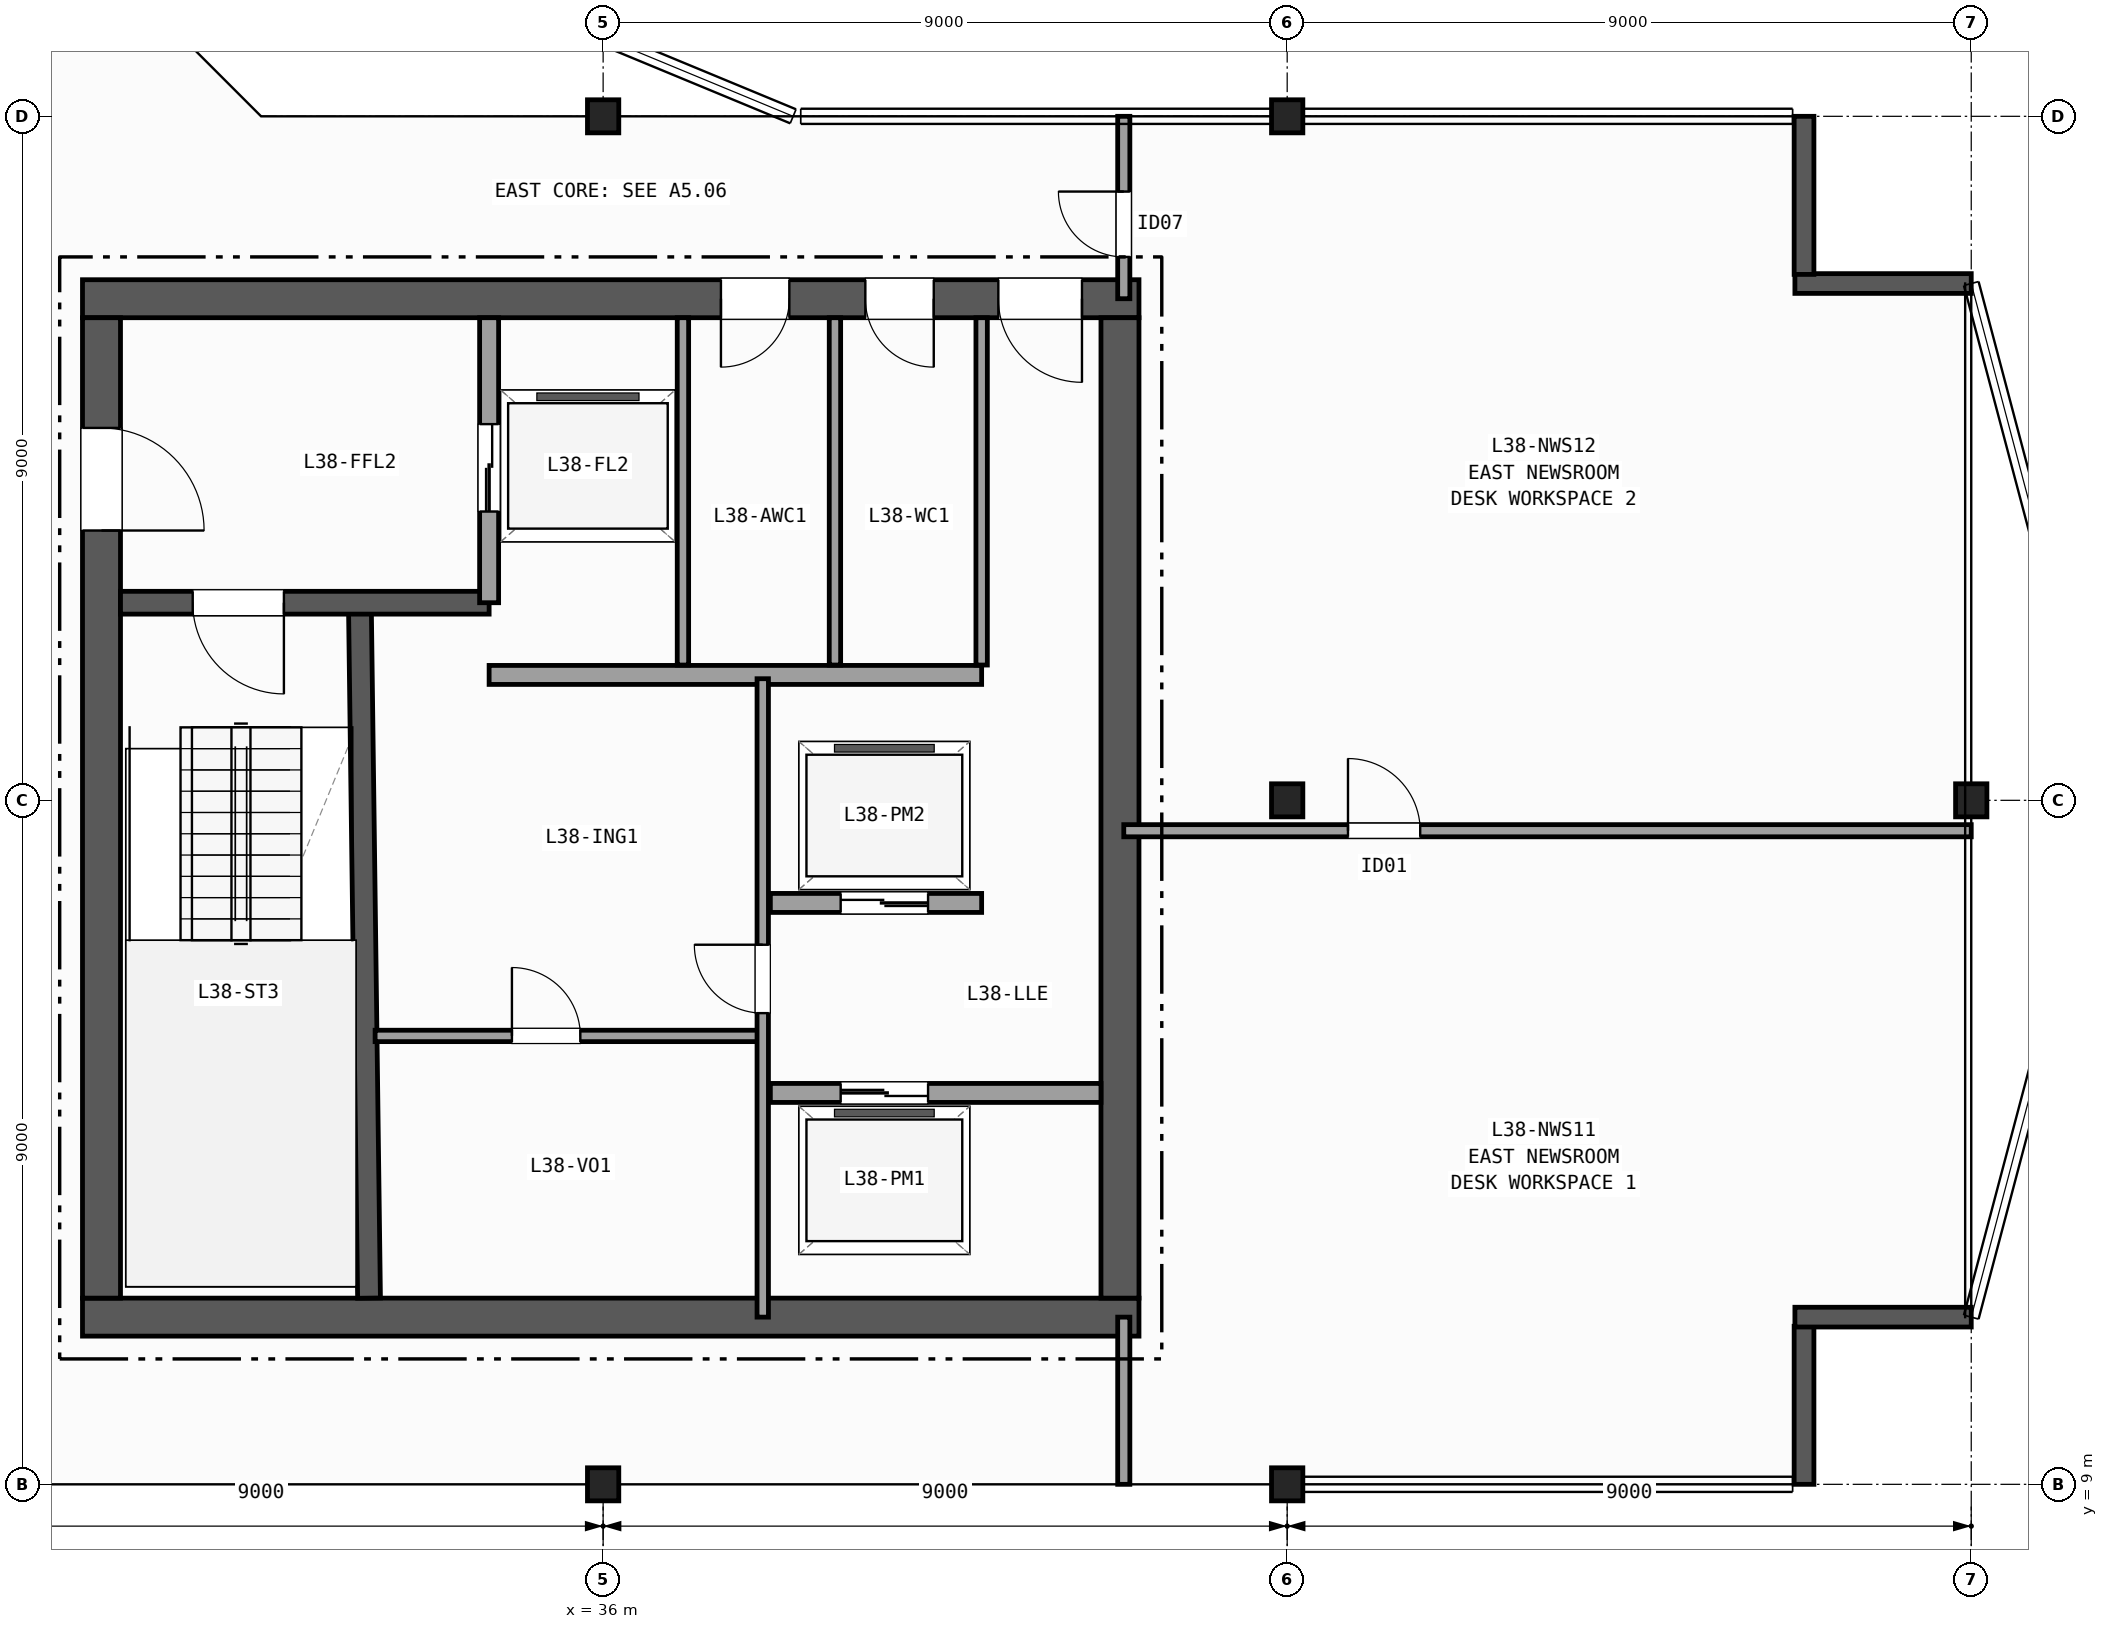
"""IFC4 building model, lengths in metres.
Left out: names, types, materials, properties, quantities, classifications, styles, units other than length and angle.
Written with IfcOpenShell. Run it as: python <this file> out.ifc"""

import sys

from ifc_helpers import new_model, si_unit, direction, frame, frame_2d, origin, origin_2d, place, context, subcontext, project, spatial, rectangle, i_section, extrude, element, fill, save


model = new_model("IFC4")
c1 = context("Model", 3, precision=1e-05, world=origin(), true_north=direction((0.0, 1.0)))
c2 = subcontext(c1, "Body", "Model", "MODEL_VIEW")
j1 = project(units=[si_unit("LENGTHUNIT", "METRE"), si_unit("PLANEANGLEUNIT", "RADIAN")], contexts=[c1])
p1 = place(None, origin())
s1 = spatial("IfcSite", under=j1, at=p1, CompositionType="ELEMENT")
p2 = place(p1, origin())
s2 = spatial("IfcBuilding", under=s1, at=p2, CompositionType="ELEMENT")
p3 = place(p2, frame((0.0, 0.0, 154.4)))
s3 = spatial("IfcBuildingStorey", under=s2, at=p3, CompositionType="ELEMENT", Elevation=154.4)
for number, where, z_axis, x_axis in (
    (1, (36.0, 9.0, 0.0), (0.0, 0.0, 1.0), (1.0, 0.0, 0.0)),
    (2, (36.0, 27.0, 0.0), (0.0, 0.0, 1.0), (1.0, 0.0, 0.0)),
    (3, (45.0, 9.0, 0.0), (0.0, 0.0, 1.0), (1.0, 0.0, 0.0)),
    (4, (45.0, 18.0, 0.0), (0.0, 0.0, 1.0), (1.0, 0.0, 0.0)),
    (5, (45.0, 27.0, 0.0), (0.0, 0.0, 1.0), (1.0, 0.0, 0.0)),
    (6, (54.0, 18.0, 0.0), (0.0, 0.0, 1.0), (1.0, 0.0, 0.0)),
):
    element("IfcColumn", number, at=place(p3, frame(where, z_axis=z_axis, x_axis=x_axis)), inside=s3, PredefinedType="COLUMN", context=c2, shape_type="SweptSolid", body=[
        extrude(i_section(OverallWidth=0.412, OverallDepth=0.435, WebThickness=0.036, FlangeThickness=0.057, FilletRadius=0.015, at=origin_2d()), origin(), (0.0, 0.0, 1.0), 3.7),
    ])
p4 = place(p3, frame((51.8, 9.0, 0.0), z_axis=(0.0, 0.0, 1.0), x_axis=(0.0, 1.0, 0.0)))
e7 = element("IfcWall", 7, at=p4, inside=s3, PredefinedType="SOLIDWALL", context=c2, shape_type="SweptSolid", body=[
    extrude(rectangle(XDim=2.08, YDim=0.26, at=frame_2d((1.04, 0.0))), origin(), (0.0, 0.0, 1.0), 3.42),
])
for number, where, z_axis, x_axis in (
    (8, (51.68, 11.2, 0.0), (0.0, 0.0, 1.0), (1.0, 0.0, 0.0)),
    (9, (54.0, 24.8, 0.0), (0.0, 0.0, 1.0), (-1.0, 0.0, 0.0)),
):
    element("IfcWall", number, at=place(p3, frame(where, z_axis=z_axis, x_axis=x_axis)), inside=s3, PredefinedType="SOLIDWALL", context=c2, shape_type="SweptSolid", body=[
        extrude(rectangle(XDim=2.32, YDim=0.26, at=frame_2d((1.16, 0.0))), origin(), (0.0, 0.0, 1.0), 3.42),
    ])
p5 = place(p3, frame((51.8, 24.92, 0.0), z_axis=(0.0, 0.0, 1.0), x_axis=(0.0, 1.0, 0.0)))
e10 = element("IfcWall", 10, at=p5, inside=s3, PredefinedType="SOLIDWALL", context=c2, shape_type="SweptSolid", body=[
    extrude(rectangle(XDim=2.08, YDim=0.26, at=frame_2d((1.04, 0.0))), origin(), (0.0, 0.0, 1.0), 3.42),
])
p6 = place(p3, frame((29.15, 11.2, 0.0), z_axis=(0.0, 0.0, 1.0), x_axis=(1.0, 0.0, 0.0)))
e11 = element("IfcWall", 11, at=p6, inside=s3, PredefinedType="SHEAR", context=c2, shape_type="SweptSolid", body=[
    extrude(rectangle(XDim=13.9, YDim=0.5, at=frame_2d((6.95, 0.0))), origin(), (0.0, 0.0, 1.0), 3.42),
])
p7 = place(p3, frame((43.05, 24.6, 0.0), z_axis=(0.0, 0.0, 1.0), x_axis=(-1.0, 0.0, 0.0)))
e12 = element("IfcWall", 12, at=p7, inside=s3, PredefinedType="SHEAR", context=c2, shape_type="SweptSolid", body=[
    extrude(rectangle(XDim=13.9, YDim=0.5, at=frame_2d((6.95, 0.0))), origin(), (0.0, 0.0, 1.0), 3.42),
])
p8 = place(p7, frame((0.75, 0.0, 0.0)))
e13 = element("IfcOpeningElement", 13, at=p8, cuts=e12, PredefinedType="OPENING", context=c2, shape_type="SweptSolid", body=[
    extrude(rectangle(XDim=1.1, YDim=2.15, at=frame_2d((0.55, 1.075))), frame((0.0, 0.26, 0.0), z_axis=(0.0, -1.0, 0.0), x_axis=(1.0, 0.0, 0.0)), (0.0, 0.0, 1.0), 0.52),
])
p9 = place(p7, frame((2.7, 0.0, 0.0)))
e14 = element("IfcOpeningElement", 14, at=p9, cuts=e12, PredefinedType="OPENING", context=c2, shape_type="SweptSolid", body=[
    extrude(rectangle(XDim=0.9, YDim=2.1, at=frame_2d((0.45, 1.05))), frame((0.0, 0.26, 0.0), z_axis=(0.0, -1.0, 0.0), x_axis=(1.0, 0.0, 0.0)), (0.0, 0.0, 1.0), 0.52),
])
p10 = place(p7, frame((4.6, 0.0, 0.0)))
e15 = element("IfcOpeningElement", 15, at=p10, cuts=e12, PredefinedType="OPENING", context=c2, shape_type="SweptSolid", body=[
    extrude(rectangle(XDim=0.9, YDim=2.1, at=frame_2d((0.45, 1.05))), frame((0.0, 0.26, 0.0), z_axis=(0.0, -1.0, 0.0), x_axis=(1.0, 0.0, 0.0)), (0.0, 0.0, 1.0), 0.52),
])
p11 = place(p3, frame((29.4, 24.35, 0.0), z_axis=(0.0, 0.0, 1.0), x_axis=(0.0, -1.0, 0.0)))
e16 = element("IfcWall", 16, at=p11, inside=s3, PredefinedType="SHEAR", context=c2, shape_type="SweptSolid", body=[
    extrude(rectangle(XDim=12.9, YDim=0.5, at=frame_2d((6.45, 0.0))), origin(), (0.0, 0.0, 1.0), 3.42),
])
p12 = place(p11, frame((1.45, 0.0, 0.0)))
e17 = element("IfcOpeningElement", 17, at=p12, cuts=e16, PredefinedType="OPENING", context=c2, shape_type="SweptSolid", body=[
    extrude(rectangle(XDim=1.35, YDim=2.15, at=frame_2d((0.675, 1.075))), frame((0.0, 0.26, 0.0), z_axis=(0.0, -1.0, 0.0), x_axis=(1.0, 0.0, 0.0)), (0.0, 0.0, 1.0), 0.52),
])
p13 = place(p3, frame((42.8, 11.45, 0.0), z_axis=(0.0, 0.0, 1.0), x_axis=(0.0, 1.0, 0.0)))
e18 = element("IfcWall", 18, at=p13, inside=s3, PredefinedType="SHEAR", context=c2, shape_type="SweptSolid", body=[
    extrude(rectangle(XDim=12.9, YDim=0.5, at=frame_2d((6.45, 0.0))), origin(), (0.0, 0.0, 1.0), 3.42),
])
p14 = place(p3, frame((32.92, 11.45, 0.0), z_axis=(0.0, 0.0, 1.0), x_axis=(-0.013171578211, 0.999913251001, 0.0)))
e19 = element("IfcWall", 19, at=p14, inside=s3, PredefinedType="SHEAR", context=c2, shape_type="SweptSolid", body=[
    extrude(rectangle(XDim=9.101, YDim=0.3, at=frame_2d((4.55, 0.0))), origin(), (0.0, 0.0, 1.0), 3.42),
])
p15 = place(p3, frame((34.5, 20.6, 0.0), z_axis=(0.0, 0.0, 1.0), x_axis=(-1.0, 0.0, 0.0)))
e20 = element("IfcWall", 20, at=p15, inside=s3, PredefinedType="SHEAR", context=c2, shape_type="SweptSolid", body=[
    extrude(rectangle(XDim=4.85, YDim=0.3, at=frame_2d((2.425, 0.0))), origin(), (0.0, 0.0, 1.0), 3.42),
])
p16 = place(p15, frame((2.7, 0.0, 0.0)))
e21 = element("IfcOpeningElement", 21, at=p16, cuts=e20, PredefinedType="OPENING", context=c2, shape_type="SweptSolid", body=[
    extrude(rectangle(XDim=1.2, YDim=2.15, at=frame_2d((0.6, 1.075))), frame((0.0, 0.16, 0.0), z_axis=(0.0, -1.0, 0.0), x_axis=(1.0, 0.0, 0.0)), (0.0, 0.0, 1.0), 0.32),
])
p17 = place(p3, frame((34.5, 20.6, 0.0), z_axis=(0.0, 0.0, 1.0), x_axis=(0.0, 1.0, 0.0)))
e22 = element("IfcWall", 22, at=p17, inside=s3, PredefinedType="PARTITIONING", context=c2, shape_type="SweptSolid", body=[
    extrude(rectangle(XDim=3.75, YDim=0.25, at=frame_2d((1.875, 0.0))), origin(), (0.0, 0.0, 1.0), 3.42),
])
p18 = place(p17, frame((1.2, 0.0, 0.0)))
e23 = element("IfcOpeningElement", 23, at=p18, cuts=e22, PredefinedType="OPENING", context=c2, shape_type="SweptSolid", body=[
    extrude(rectangle(XDim=1.15, YDim=2.15, at=frame_2d((0.575, 1.075))), frame((0.0, 0.135, 0.0), z_axis=(0.0, -1.0, 0.0), x_axis=(1.0, 0.0, 0.0)), (0.0, 0.0, 1.0), 0.27),
])
p19 = place(p3, frame((34.5, 19.65, 0.0), z_axis=(0.0, 0.0, 1.0), x_axis=(1.0, 0.0, 0.0)))
e24 = element("IfcWall", 24, at=p19, inside=s3, PredefinedType="PARTITIONING", context=c2, shape_type="SweptSolid", body=[
    extrude(rectangle(XDim=6.48, YDim=0.25, at=frame_2d((3.24, 0.0))), origin(), (0.0, 0.0, 1.0), 3.42),
])
p20 = place(p3, frame((38.2, 14.15, 0.0), z_axis=(0.0, 0.0, 1.0), x_axis=(1.0, 0.0, 0.0)))
e25 = element("IfcWall", 25, at=p20, inside=s3, PredefinedType="PARTITIONING", context=c2, shape_type="SweptSolid", body=[
    extrude(rectangle(XDim=4.35, YDim=0.25, at=frame_2d((2.175, 0.0))), origin(), (0.0, 0.0, 1.0), 3.42),
])
p21 = place(p20, frame((0.925, 0.0, 0.0)))
e26 = element("IfcOpeningElement", 26, at=p21, cuts=e25, PredefinedType="OPENING", context=c2, shape_type="SweptSolid", body=[
    extrude(rectangle(XDim=1.15, YDim=2.15, at=frame_2d((0.575, 1.075))), frame((0.0, 0.135, 0.0), z_axis=(0.0, -1.0, 0.0), x_axis=(1.0, 0.0, 0.0)), (0.0, 0.0, 1.0), 0.27),
])
p22 = place(p3, frame((40.98, 16.65, 0.0), z_axis=(0.0, 0.0, 1.0), x_axis=(-1.0, 0.0, 0.0)))
e27 = element("IfcWall", 27, at=p22, inside=s3, PredefinedType="PARTITIONING", context=c2, shape_type="SweptSolid", body=[
    extrude(rectangle(XDim=2.78, YDim=0.25, at=frame_2d((1.39, 0.0))), origin(), (0.0, 0.0, 1.0), 3.42),
])
p23 = place(p22, frame((0.705, 0.0, 0.0)))
e28 = element("IfcOpeningElement", 28, at=p23, cuts=e27, PredefinedType="OPENING", context=c2, shape_type="SweptSolid", body=[
    extrude(rectangle(XDim=1.15, YDim=2.15, at=frame_2d((0.575, 1.075))), frame((0.0, 0.135, 0.0), z_axis=(0.0, -1.0, 0.0), x_axis=(1.0, 0.0, 0.0)), (0.0, 0.0, 1.0), 0.27),
])
p24 = place(p3, frame((33.0, 14.9, 0.0), z_axis=(0.0, 0.0, 1.0), x_axis=(1.0, 0.0, 0.0)))
e29 = element("IfcWall", 29, at=p24, inside=s3, PredefinedType="PARTITIONING", context=c2, shape_type="SweptSolid", body=[
    extrude(rectangle(XDim=5.1, YDim=0.15, at=frame_2d((2.55, 0.0))), origin(), (0.0, 0.0, 1.0), 3.42),
])
p25 = place(p24, frame((1.8, 0.0, 0.0)))
e30 = element("IfcOpeningElement", 30, at=p25, cuts=e29, PredefinedType="OPENING", context=c2, shape_type="SweptSolid", body=[
    extrude(rectangle(XDim=0.9, YDim=2.1, at=frame_2d((0.45, 1.05))), frame((0.0, 0.085, 0.0), z_axis=(0.0, -1.0, 0.0), x_axis=(1.0, 0.0, 0.0)), (0.0, 0.0, 1.0), 0.17),
])
p26 = place(p3, frame((38.1, 11.2, 0.0), z_axis=(0.0, 0.0, 1.0), x_axis=(0.0, 1.0, 0.0)))
e31 = element("IfcWall", 31, at=p26, inside=s3, PredefinedType="PARTITIONING", context=c2, shape_type="SweptSolid", body=[
    extrude(rectangle(XDim=8.4, YDim=0.15, at=frame_2d((4.2, 0.0))), origin(), (0.0, 0.0, 1.0), 3.42),
])
p27 = place(p26, frame((4.0, 0.0, 0.0)))
e32 = element("IfcOpeningElement", 32, at=p27, cuts=e31, PredefinedType="OPENING", context=c2, shape_type="SweptSolid", body=[
    extrude(rectangle(XDim=0.9, YDim=2.1, at=frame_2d((0.45, 1.05))), frame((0.0, 0.085, 0.0), z_axis=(0.0, -1.0, 0.0), x_axis=(1.0, 0.0, 0.0)), (0.0, 0.0, 1.0), 0.17),
])
for number, where, z_axis, x_axis in (
    (33, (37.05, 19.78, 0.0), (0.0, 0.0, 1.0), (0.0, 1.0, 0.0)),
    (34, (39.05, 19.78, 0.0), (0.0, 0.0, 1.0), (0.0, 1.0, 0.0)),
    (35, (40.98, 19.78, 0.0), (0.0, 0.0, 1.0), (0.0, 1.0, 0.0)),
):
    element("IfcWall", number, at=place(p3, frame(where, z_axis=z_axis, x_axis=x_axis)), inside=s3, PredefinedType="PARTITIONING", context=c2, shape_type="SweptSolid", body=[
        extrude(rectangle(XDim=4.57, YDim=0.15, at=frame_2d((2.285, 0.0))), origin(), (0.0, 0.0, 1.0), 3.42),
    ])
p28 = place(p3, frame((42.85, 9.0, 0.0), z_axis=(0.0, 0.0, 1.0), x_axis=(0.0, 1.0, 0.0)))
e36 = element("IfcWall", 36, at=p28, inside=s3, PredefinedType="PARTITIONING", context=c2, shape_type="SweptSolid", body=[
    extrude(rectangle(XDim=2.2, YDim=0.16, at=frame_2d((1.1, 0.0))), origin(), (0.0, 0.0, 1.0), 2.634),
])
p29 = place(p3, frame((42.85, 24.6, 0.0), z_axis=(0.0, 0.0, 1.0), x_axis=(0.0, 1.0, 0.0)))
e37 = element("IfcWall", 37, at=p29, inside=s3, PredefinedType="PARTITIONING", context=c2, shape_type="SweptSolid", body=[
    extrude(rectangle(XDim=2.4, YDim=0.16, at=frame_2d((1.2, 0.0))), origin(), (0.0, 0.0, 1.0), 2.634),
])
p30 = place(p29, frame((0.55, 0.0, 0.0)))
e38 = element("IfcOpeningElement", 38, at=p30, cuts=e37, PredefinedType="OPENING", context=c2, shape_type="SweptSolid", body=[
    extrude(rectangle(XDim=0.86, YDim=2.05, at=frame_2d((0.43, 1.025))), frame((0.0, 0.09, 0.0), z_axis=(0.0, -1.0, 0.0), x_axis=(1.0, 0.0, 0.0)), (0.0, 0.0, 1.0), 0.18),
])
p31 = place(p3, frame((42.85, 17.6, 0.0), z_axis=(0.0, 0.0, 1.0), x_axis=(1.0, 0.0, 0.0)))
e39 = element("IfcWall", 39, at=p31, inside=s3, PredefinedType="PARTITIONING", context=c2, shape_type="SweptSolid", body=[
    extrude(rectangle(XDim=11.15, YDim=0.16, at=frame_2d((5.575, 0.0))), origin(), (0.0, 0.0, 1.0), 3.42),
])
p32 = place(p31, frame((2.95, 0.0, 0.0)))
e40 = element("IfcOpeningElement", 40, at=p32, cuts=e39, PredefinedType="OPENING", context=c2, shape_type="SweptSolid", body=[
    extrude(rectangle(XDim=0.95, YDim=2.1, at=frame_2d((0.475, 1.05))), frame((0.0, 0.09, 0.0), z_axis=(0.0, -1.0, 0.0), x_axis=(1.0, 0.0, 0.0)), (0.0, 0.0, 1.0), 0.18),
])
p33 = place(p16, origin())
e41 = element("IfcDoor", 41, at=p33, inside=s3, OperationType="SINGLE_SWING_LEFT", PredefinedType="DOOR", context=c2, shape_type="SweptSolid", body=[
    extrude(rectangle(XDim=1.2, YDim=2.15, at=frame_2d((0.6, 1.075))), frame((0.0, 0.025, 0.0), z_axis=(0.0, -1.0, 0.0), x_axis=(1.0, 0.0, 0.0)), (0.0, 0.0, 1.0), 0.05),
])
fill(e21, e41)
p34 = place(p12, origin())
e42 = element("IfcDoor", 42, at=p34, inside=s3, OperationType="SINGLE_SWING_RIGHT", PredefinedType="DOOR", context=c2, shape_type="SweptSolid", body=[
    extrude(rectangle(XDim=1.35, YDim=2.15, at=frame_2d((0.675, 1.075))), frame((0.0, 0.025, 0.0), z_axis=(0.0, -1.0, 0.0), x_axis=(1.0, 0.0, 0.0)), (0.0, 0.0, 1.0), 0.05),
])
fill(e17, e42)
p35 = place(p8, origin())
e43 = element("IfcDoor", 43, at=p35, inside=s3, OperationType="SINGLE_SWING_LEFT", PredefinedType="DOOR", context=c2, shape_type="SweptSolid", body=[
    extrude(rectangle(XDim=1.1, YDim=2.15, at=frame_2d((0.55, 1.075))), frame((0.0, 0.025, 0.0), z_axis=(0.0, -1.0, 0.0), x_axis=(1.0, 0.0, 0.0)), (0.0, 0.0, 1.0), 0.05),
])
fill(e13, e43)
p36 = place(p9, origin())
e44 = element("IfcDoor", 44, at=p36, inside=s3, OperationType="SINGLE_SWING_LEFT", PredefinedType="DOOR", context=c2, shape_type="SweptSolid", body=[
    extrude(rectangle(XDim=0.9, YDim=2.1, at=frame_2d((0.45, 1.05))), frame((0.0, 0.025, 0.0), z_axis=(0.0, -1.0, 0.0), x_axis=(1.0, 0.0, 0.0)), (0.0, 0.0, 1.0), 0.05),
])
fill(e14, e44)
p37 = place(p10, origin())
e45 = element("IfcDoor", 45, at=p37, inside=s3, OperationType="SINGLE_SWING_RIGHT", PredefinedType="DOOR", context=c2, shape_type="SweptSolid", body=[
    extrude(rectangle(XDim=0.9, YDim=2.1, at=frame_2d((0.45, 1.05))), frame((0.0, 0.025, 0.0), z_axis=(0.0, -1.0, 0.0), x_axis=(1.0, 0.0, 0.0)), (0.0, 0.0, 1.0), 0.05),
])
fill(e15, e45)
p38 = place(p18, origin())
e46 = element("IfcDoor", 46, at=p38, inside=s3, OperationType="DOUBLE_DOOR_SLIDING", PredefinedType="DOOR", context=c2, shape_type="SweptSolid", body=[
    extrude(rectangle(XDim=1.15, YDim=2.15, at=frame_2d((0.575, 1.075))), frame((0.0, 0.025, 0.0), z_axis=(0.0, -1.0, 0.0), x_axis=(1.0, 0.0, 0.0)), (0.0, 0.0, 1.0), 0.05),
])
fill(e23, e46)
p39 = place(p21, origin())
e47 = element("IfcDoor", 47, at=p39, inside=s3, OperationType="DOUBLE_DOOR_SLIDING", PredefinedType="DOOR", context=c2, shape_type="SweptSolid", body=[
    extrude(rectangle(XDim=1.15, YDim=2.15, at=frame_2d((0.575, 1.075))), frame((0.0, 0.025, 0.0), z_axis=(0.0, -1.0, 0.0), x_axis=(1.0, 0.0, 0.0)), (0.0, 0.0, 1.0), 0.05),
])
fill(e26, e47)
p40 = place(p23, origin())
e48 = element("IfcDoor", 48, at=p40, inside=s3, OperationType="DOUBLE_DOOR_SLIDING", PredefinedType="DOOR", context=c2, shape_type="SweptSolid", body=[
    extrude(rectangle(XDim=1.15, YDim=2.15, at=frame_2d((0.575, 1.075))), frame((0.0, 0.025, 0.0), z_axis=(0.0, -1.0, 0.0), x_axis=(1.0, 0.0, 0.0)), (0.0, 0.0, 1.0), 0.05),
])
fill(e28, e48)
p41 = place(p27, origin())
e49 = element("IfcDoor", 49, at=p41, inside=s3, OperationType="SINGLE_SWING_RIGHT", PredefinedType="DOOR", context=c2, shape_type="SweptSolid", body=[
    extrude(rectangle(XDim=0.9, YDim=2.1, at=frame_2d((0.45, 1.05))), frame((0.0, 0.025, 0.0), z_axis=(0.0, -1.0, 0.0), x_axis=(1.0, 0.0, 0.0)), (0.0, 0.0, 1.0), 0.05),
])
fill(e32, e49)
p42 = place(p25, origin())
e50 = element("IfcDoor", 50, at=p42, inside=s3, OperationType="SINGLE_SWING_LEFT", PredefinedType="DOOR", context=c2, shape_type="SweptSolid", body=[
    extrude(rectangle(XDim=0.9, YDim=2.1, at=frame_2d((0.45, 1.05))), frame((0.0, 0.025, 0.0), z_axis=(0.0, -1.0, 0.0), x_axis=(1.0, 0.0, 0.0)), (0.0, 0.0, 1.0), 0.05),
])
fill(e30, e50)
p43 = place(p30, origin())
e51 = element("IfcDoor", 51, at=p43, inside=s3, OperationType="SINGLE_SWING_RIGHT", PredefinedType="DOOR", context=c2, shape_type="SweptSolid", body=[
    extrude(rectangle(XDim=0.86, YDim=2.05, at=frame_2d((0.43, 1.025))), frame((0.0, 0.025, 0.0), z_axis=(0.0, -1.0, 0.0), x_axis=(1.0, 0.0, 0.0)), (0.0, 0.0, 1.0), 0.05),
])
fill(e38, e51)
p44 = place(p32, origin())
e52 = element("IfcDoor", 52, at=p44, inside=s3, OperationType="SINGLE_SWING_LEFT", PredefinedType="DOOR", context=c2, shape_type="SweptSolid", body=[
    extrude(rectangle(XDim=0.95, YDim=2.1, at=frame_2d((0.475, 1.05))), frame((0.0, 0.025, 0.0), z_axis=(0.0, -1.0, 0.0), x_axis=(1.0, 0.0, 0.0)), (0.0, 0.0, 1.0), 0.05),
])
fill(e40, e52)
save(model, sys.argv[1])
